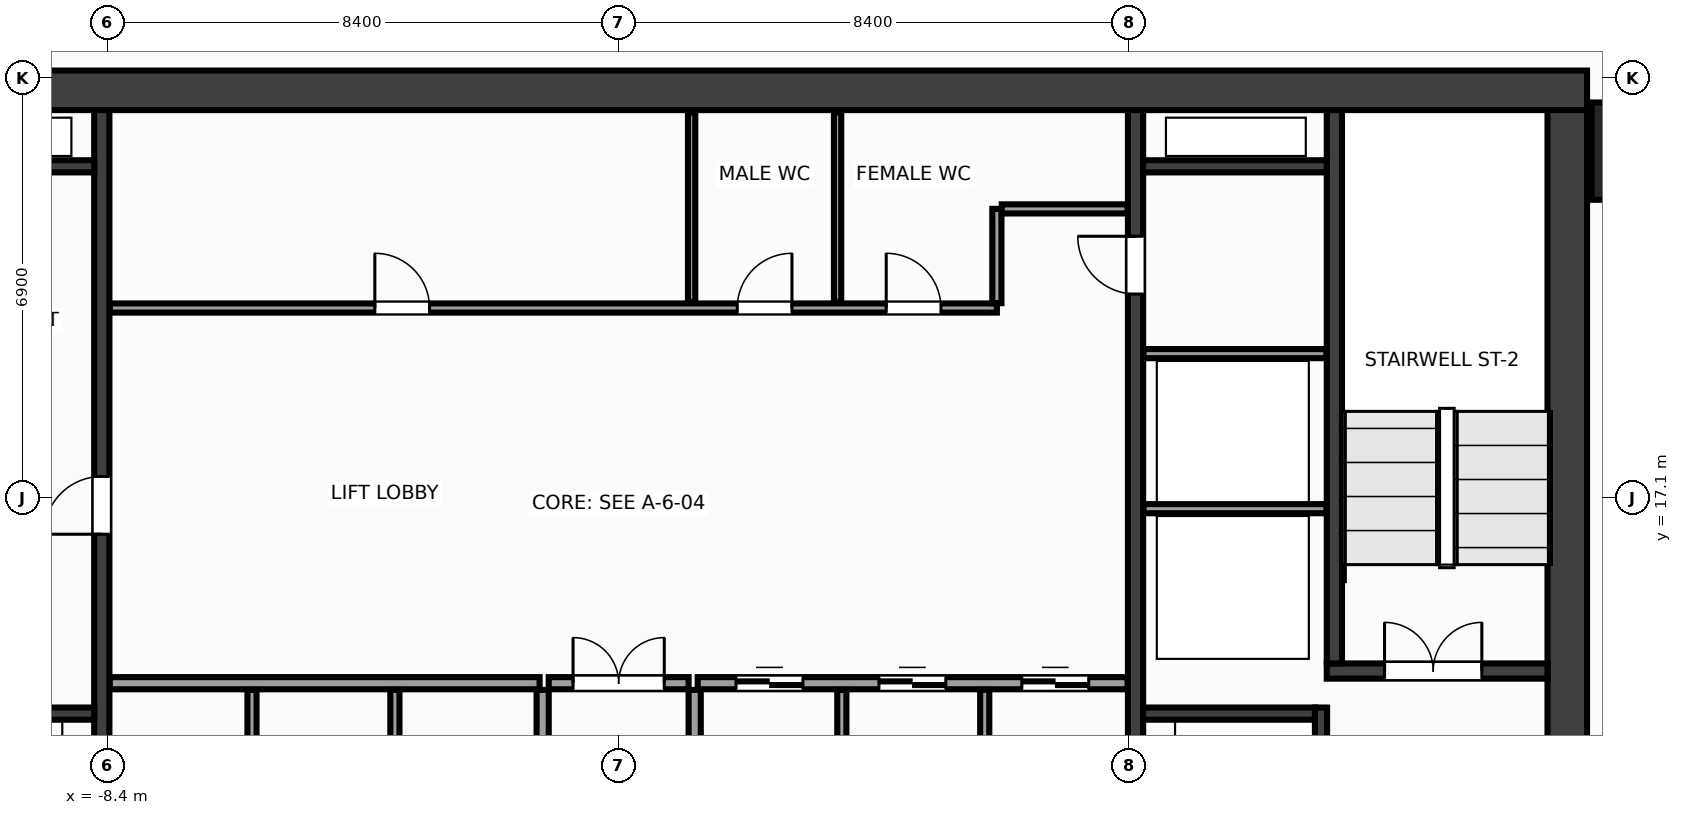
"""IFC4 building model, lengths in metres.
Left out: names, types, materials, properties, quantities, classifications, styles, units other than length and angle.
Written with IfcOpenShell. Run it as: python <this file> out.ifc"""

import sys

from ifc_helpers import new_model, si_unit, direction, frame, frame_2d, origin, origin_2d, place, context, subcontext, project, spatial, rectangle, extrude, source, transform, mapped, element, fill, save


model = new_model("IFC4")
c1 = context("Model", 3, precision=1e-05, world=origin(), true_north=direction((0.0, 1.0)))
c2 = subcontext(c1, "Body", "Model", "MODEL_VIEW")
j1 = project(units=[si_unit("LENGTHUNIT", "METRE"), si_unit("PLANEANGLEUNIT", "RADIAN")], contexts=[c1])
p1 = place(None, origin())
s1 = spatial("IfcSite", under=j1, at=p1, CompositionType="ELEMENT")
p2 = place(p1, origin())
s2 = spatial("IfcBuilding", under=s1, at=p2, CompositionType="ELEMENT")
p3 = place(p2, frame((0.0, 0.0, 81.2)))
s3 = spatial("IfcBuildingStorey", under=s2, at=p3, CompositionType="ELEMENT", Elevation=81.2)
m1 = source(origin(), c2, "Body", "SweptSolid", [
    extrude(rectangle(XDim=31.85, YDim=0.65, at=frame_2d((15.925, 0.0))), origin(), (0.0, 0.0, 1.0), 3.6),
])
p4 = place(p3, frame((-15.925, 23.8, 0.0), z_axis=(0.0, 0.0, 1.0), x_axis=(1.0, 0.0, 0.0)))
e1 = element("IfcWall", 1, at=p4, inside=s3, PredefinedType="SHEAR", context=c2, shape_type="MappedRepresentation", body=[
    mapped(m1, transform((0.0, 0.0, 0.0), x_axis=(1.0, 0.0, 0.0), y_axis=(0.0, 1.0, 0.0), z_axis=(0.0, 0.0, 1.0), scale=1.0)),
])
m2 = source(origin(), c2, "Body", "SweptSolid", [
    extrude(rectangle(XDim=12.95, YDim=0.65, at=frame_2d((6.475, 0.0))), origin(), (0.0, 0.0, 1.0), 3.6),
])
p5 = place(p3, frame((15.6, 10.525, 0.0), z_axis=(0.0, 0.0, 1.0), x_axis=(0.0, 1.0, 0.0)))
e2 = element("IfcWall", 2, at=p5, inside=s3, PredefinedType="SHEAR", context=c2, shape_type="MappedRepresentation", body=[
    mapped(m2, transform((0.0, 0.0, 0.0), x_axis=(1.0, 0.0, 0.0), y_axis=(0.0, 1.0, 0.0), z_axis=(0.0, 0.0, 1.0), scale=1.0)),
])
m3 = source(origin(), c2, "Body", "SweptSolid", [
    extrude(rectangle(XDim=12.95, YDim=0.25, at=frame_2d((6.475, 0.0))), origin(), (0.0, 0.0, 1.0), 3.6),
])
p6 = place(p3, frame((-8.5, 10.525, 0.0), z_axis=(0.0, 0.0, 1.0), x_axis=(0.0, 1.0, 0.0)))
e3 = element("IfcWall", 3, at=p6, inside=s3, PredefinedType="SHEAR", context=c2, shape_type="MappedRepresentation", body=[
    mapped(m3, transform((0.0, 0.0, 0.0), x_axis=(1.0, 0.0, 0.0), y_axis=(0.0, 1.0, 0.0), z_axis=(0.0, 0.0, 1.0), scale=1.0)),
])
p7 = place(p6, frame((5.975, 0.0, 0.0)))
e4 = element("IfcOpeningElement", 4, at=p7, cuts=e3, PredefinedType="OPENING", context=c2, shape_type="SweptSolid", body=[
    extrude(rectangle(XDim=0.95, YDim=2.15, at=frame_2d((0.475, 1.075))), frame((0.0, 0.137, 0.0), z_axis=(0.0, -1.0, 0.0), x_axis=(1.0, 0.0, 0.0)), (0.0, 0.0, 1.0), 0.274),
])
p8 = place(p3, frame((8.5, 10.525, 0.0), z_axis=(0.0, 0.0, 1.0), x_axis=(0.0, 1.0, 0.0)))
e5 = element("IfcWall", 5, at=p8, inside=s3, PredefinedType="SHEAR", context=c2, shape_type="MappedRepresentation", body=[
    mapped(m3, transform((0.0, 0.0, 0.0), x_axis=(1.0, 0.0, 0.0), y_axis=(0.0, 1.0, 0.0), z_axis=(0.0, 0.0, 1.0), scale=1.0)),
])
p9 = place(p8, frame((9.925, 0.0, 0.0)))
e6 = element("IfcOpeningElement", 6, at=p9, cuts=e5, PredefinedType="OPENING", context=c2, shape_type="SweptSolid", body=[
    extrude(rectangle(XDim=0.95, YDim=2.15, at=frame_2d((0.475, 1.075))), frame((0.0, 0.137, 0.0), z_axis=(0.0, -1.0, 0.0), x_axis=(1.0, 0.0, 0.0)), (0.0, 0.0, 1.0), 0.274),
])
m4 = source(origin(), c2, "Body", "SweptSolid", [
    extrude(rectangle(XDim=3.63, YDim=0.25, at=frame_2d((1.815, 0.0))), origin(), (0.0, 0.0, 1.0), 3.6),
])
p10 = place(p3, frame((11.645, 14.25, 0.0), z_axis=(0.0, 0.0, 1.0), x_axis=(1.0, 0.0, 0.0)))
e7 = element("IfcWall", 7, at=p10, inside=s3, PredefinedType="SHEAR", context=c2, shape_type="MappedRepresentation", body=[
    mapped(m4, transform((0.0, 0.0, 0.0), x_axis=(1.0, 0.0, 0.0), y_axis=(0.0, 1.0, 0.0), z_axis=(0.0, 0.0, 1.0), scale=1.0)),
])
p11 = place(p10, frame((0.95, 0.0, 0.0)))
e8 = element("IfcOpeningElement", 8, at=p11, cuts=e7, PredefinedType="OPENING", context=c2, shape_type="SweptSolid", body=[
    extrude(rectangle(XDim=1.6, YDim=2.15, at=frame_2d((0.8, 1.075))), frame((0.0, 0.137, 0.0), z_axis=(0.0, -1.0, 0.0), x_axis=(1.0, 0.0, 0.0)), (0.0, 0.0, 1.0), 0.274),
])
m5 = source(origin(), c2, "Body", "SweptSolid", [
    extrude(rectangle(XDim=9.1, YDim=0.25, at=frame_2d((4.55, 0.0))), origin(), (0.0, 0.0, 1.0), 3.6),
])
p12 = place(p3, frame((11.77, 14.375, 0.0), z_axis=(0.0, 0.0, 1.0), x_axis=(0.0, 1.0, 0.0)))
e9 = element("IfcWall", 9, at=p12, inside=s3, PredefinedType="SHEAR", context=c2, shape_type="MappedRepresentation", body=[
    mapped(m5, transform((0.0, 0.0, 0.0), x_axis=(1.0, 0.0, 0.0), y_axis=(0.0, 1.0, 0.0), z_axis=(0.0, 0.0, 1.0), scale=1.0)),
])
m6 = source(origin(), c2, "Body", "SweptSolid", [
    extrude(rectangle(XDim=2.825, YDim=0.2, at=frame_2d((1.413, 0.0))), origin(), (0.0, 0.0, 1.0), 3.6),
])
p13 = place(p3, frame((-11.45, 13.55, 0.0), z_axis=(0.0, 0.0, 1.0), x_axis=(1.0, 0.0, 0.0)))
e10 = element("IfcWall", 10, at=p13, inside=s3, PredefinedType="SHEAR", context=c2, shape_type="MappedRepresentation", body=[
    mapped(m6, transform((0.0, 0.0, 0.0), x_axis=(1.0, 0.0, 0.0), y_axis=(0.0, 1.0, 0.0), z_axis=(0.0, 0.0, 1.0), scale=1.0)),
])
m7 = source(origin(), c2, "Body", "SweptSolid", [
    extrude(rectangle(XDim=3.125, YDim=0.2, at=frame_2d((1.562, 0.0))), origin(), (0.0, 0.0, 1.0), 3.6),
])
p14 = place(p3, frame((11.55, 10.525, 0.0), z_axis=(0.0, 0.0, 1.0), x_axis=(0.0, 1.0, 0.0)))
e11 = element("IfcWall", 11, at=p14, inside=s3, PredefinedType="SHEAR", context=c2, shape_type="MappedRepresentation", body=[
    mapped(m7, transform((0.0, 0.0, 0.0), x_axis=(1.0, 0.0, 0.0), y_axis=(0.0, 1.0, 0.0), z_axis=(0.0, 0.0, 1.0), scale=1.0)),
])
p15 = place(p14, frame((0.9, 0.0, 0.0)))
e12 = element("IfcOpeningElement", 12, at=p15, cuts=e11, PredefinedType="OPENING", context=c2, shape_type="SweptSolid", body=[
    extrude(rectangle(XDim=1.1, YDim=2.15, at=frame_2d((0.55, 1.075))), frame((0.0, 0.112, 0.0), z_axis=(0.0, -1.0, 0.0), x_axis=(1.0, 0.0, 0.0)), (0.0, 0.0, 1.0), 0.224),
])
p16 = place(p3, frame((8.625, 13.55, 0.0), z_axis=(0.0, 0.0, 1.0), x_axis=(1.0, 0.0, 0.0)))
e13 = element("IfcWall", 13, at=p16, inside=s3, PredefinedType="SHEAR", context=c2, shape_type="MappedRepresentation", body=[
    mapped(m6, transform((0.0, 0.0, 0.0), x_axis=(1.0, 0.0, 0.0), y_axis=(0.0, 1.0, 0.0), z_axis=(0.0, 0.0, 1.0), scale=1.0)),
])
m8 = source(origin(), c2, "Body", "SweptSolid", [
    extrude(rectangle(XDim=3.02, YDim=0.2, at=frame_2d((1.51, 0.0))), origin(), (0.0, 0.0, 1.0), 3.6),
])
for number, where, z_axis, x_axis in (
    (14, (-11.645, 22.55, 0.0), (0.0, 0.0, 1.0), (1.0, 0.0, 0.0)),
    (15, (8.625, 22.55, 0.0), (0.0, 0.0, 1.0), (1.0, 0.0, 0.0)),
):
    element("IfcWall", number, at=place(p3, frame(where, z_axis=z_axis, x_axis=x_axis)), inside=s3, PredefinedType="SHEAR", context=c2, shape_type="MappedRepresentation", body=[
        mapped(m8, transform((0.0, 0.0, 0.0), x_axis=(1.0, 0.0, 0.0), y_axis=(0.0, 1.0, 0.0), z_axis=(0.0, 0.0, 1.0), scale=1.0)),
    ])
m9 = source(origin(), c2, "Body", "SweptSolid", [
    extrude(rectangle(XDim=1.6, YDim=1.6, at=origin_2d()), origin(), (0.0, 0.0, 1.0), 3.6),
])
p17 = place(p3, frame((16.8, 22.8, 0.0), z_axis=(0.0, 0.0, 1.0), x_axis=(1.0, 0.0, 0.0)))
e16 = element("IfcColumn", 16, at=p17, inside=s3, PredefinedType="COLUMN", context=c2, shape_type="MappedRepresentation", body=[
    mapped(m9, transform((0.0, 0.0, 0.0), x_axis=(1.0, 0.0, 0.0), y_axis=(0.0, 1.0, 0.0), z_axis=(0.0, 0.0, 1.0), scale=1.0)),
])
m10 = source(origin(), c2, "Body", "SweptSolid", [
    extrude(rectangle(XDim=3.01, YDim=0.15, at=frame_2d((1.505, 0.0))), origin(), (0.0, 0.0, 1.0), 3.36),
])
for number, where, z_axis, x_axis in (
    (17, (8.63, 16.92, 0.0), (0.0, 0.0, 1.0), (1.0, 0.0, 0.0)),
    (18, (8.63, 19.47, 0.0), (0.0, 0.0, 1.0), (1.0, 0.0, 0.0)),
):
    element("IfcWall", number, at=place(p3, frame(where, z_axis=z_axis, x_axis=x_axis)), inside=s3, PredefinedType="PARTITIONING", context=c2, shape_type="MappedRepresentation", body=[
        mapped(m10, transform((0.0, 0.0, 0.0), x_axis=(1.0, 0.0, 0.0), y_axis=(0.0, 1.0, 0.0), z_axis=(0.0, 0.0, 1.0), scale=1.0)),
    ])
m11 = source(origin(), c2, "Body", "SweptSolid", [
    extrude(rectangle(XDim=7.07, YDim=0.2, at=frame_2d((3.535, 0.0))), origin(), (0.0, 0.0, 1.0), 3.36),
])
p18 = place(p3, frame((-8.37, 14.05, 0.0), z_axis=(0.0, 0.0, 1.0), x_axis=(1.0, 0.0, 0.0)))
e19 = element("IfcWall", 19, at=p18, inside=s3, PredefinedType="PARTITIONING", context=c2, shape_type="MappedRepresentation", body=[
    mapped(m11, transform((0.0, 0.0, 0.0), x_axis=(1.0, 0.0, 0.0), y_axis=(0.0, 1.0, 0.0), z_axis=(0.0, 0.0, 1.0), scale=1.0)),
])
p19 = place(p3, frame((1.3, 14.05, 0.0), z_axis=(0.0, 0.0, 1.0), x_axis=(1.0, 0.0, 0.0)))
e20 = element("IfcWall", 20, at=p19, inside=s3, PredefinedType="PARTITIONING", context=c2, shape_type="MappedRepresentation", body=[
    mapped(m11, transform((0.0, 0.0, 0.0), x_axis=(1.0, 0.0, 0.0), y_axis=(0.0, 1.0, 0.0), z_axis=(0.0, 0.0, 1.0), scale=1.0)),
])
p20 = place(p19, frame((0.63, 0.0, 0.0)))
e21 = element("IfcOpeningElement", 21, at=p20, cuts=e20, PredefinedType="OPENING", context=c2, shape_type="SweptSolid", body=[
    extrude(rectangle(XDim=1.1, YDim=2.15, at=frame_2d((0.55, 1.075))), frame((0.0, 0.112, 0.0), z_axis=(0.0, -1.0, 0.0), x_axis=(1.0, 0.0, 0.0)), (0.0, 0.0, 1.0), 0.224),
])
p21 = place(p19, frame((2.98, 0.0, 0.0)))
e22 = element("IfcOpeningElement", 22, at=p21, cuts=e20, PredefinedType="OPENING", context=c2, shape_type="SweptSolid", body=[
    extrude(rectangle(XDim=1.1, YDim=2.15, at=frame_2d((0.55, 1.075))), frame((0.0, 0.112, 0.0), z_axis=(0.0, -1.0, 0.0), x_axis=(1.0, 0.0, 0.0)), (0.0, 0.0, 1.0), 0.224),
])
p22 = place(p19, frame((5.33, 0.0, 0.0)))
e23 = element("IfcOpeningElement", 23, at=p22, cuts=e20, PredefinedType="OPENING", context=c2, shape_type="SweptSolid", body=[
    extrude(rectangle(XDim=1.1, YDim=2.15, at=frame_2d((0.55, 1.075))), frame((0.0, 0.112, 0.0), z_axis=(0.0, -1.0, 0.0), x_axis=(1.0, 0.0, 0.0)), (0.0, 0.0, 1.0), 0.224),
])
m12 = source(origin(), c2, "Body", "SweptSolid", [
    extrude(rectangle(XDim=3.415, YDim=0.2, at=frame_2d((1.708, 0.0))), origin(), (0.0, 0.0, 1.0), 3.36),
])
for number, where, z_axis, x_axis in (
    (24, (-1.25, 10.525, 0.0), (0.0, 0.0, 1.0), (0.0, 1.0, 0.0)),
    (25, (1.25, 10.525, 0.0), (0.0, 0.0, 1.0), (0.0, 1.0, 0.0)),
):
    element("IfcWall", number, at=place(p3, frame(where, z_axis=z_axis, x_axis=x_axis)), inside=s3, PredefinedType="PARTITIONING", context=c2, shape_type="MappedRepresentation", body=[
        mapped(m12, transform((0.0, 0.0, 0.0), x_axis=(1.0, 0.0, 0.0), y_axis=(0.0, 1.0, 0.0), z_axis=(0.0, 0.0, 1.0), scale=1.0)),
    ])
m13 = source(origin(), c2, "Body", "SweptSolid", [
    extrude(rectangle(XDim=2.3, YDim=0.2, at=frame_2d((1.15, 0.0))), origin(), (0.0, 0.0, 1.0), 3.36),
])
p23 = place(p3, frame((-1.15, 14.05, 0.0), z_axis=(0.0, 0.0, 1.0), x_axis=(1.0, 0.0, 0.0)))
e26 = element("IfcWall", 26, at=p23, inside=s3, PredefinedType="PARTITIONING", context=c2, shape_type="MappedRepresentation", body=[
    mapped(m13, transform((0.0, 0.0, 0.0), x_axis=(1.0, 0.0, 0.0), y_axis=(0.0, 1.0, 0.0), z_axis=(0.0, 0.0, 1.0), scale=1.0)),
])
p24 = place(p23, frame((0.4, 0.0, 0.0)))
e27 = element("IfcOpeningElement", 27, at=p24, cuts=e26, PredefinedType="OPENING", context=c2, shape_type="SweptSolid", body=[
    extrude(rectangle(XDim=1.5, YDim=2.2, at=frame_2d((0.75, 1.1))), frame((0.0, 0.112, 0.0), z_axis=(0.0, -1.0, 0.0), x_axis=(1.0, 0.0, 0.0)), (0.0, 0.0, 1.0), 0.224),
])
m14 = source(origin(), c2, "Body", "SweptSolid", [
    extrude(rectangle(XDim=14.59, YDim=0.15, at=frame_2d((7.295, 0.0))), origin(), (0.0, 0.0, 1.0), 3.36),
])
p25 = place(p3, frame((-8.37, 20.22, 0.0), z_axis=(0.0, 0.0, 1.0), x_axis=(1.0, 0.0, 0.0)))
e28 = element("IfcWall", 28, at=p25, inside=s3, PredefinedType="PARTITIONING", context=c2, shape_type="MappedRepresentation", body=[
    mapped(m14, transform((0.0, 0.0, 0.0), x_axis=(1.0, 0.0, 0.0), y_axis=(0.0, 1.0, 0.0), z_axis=(0.0, 0.0, 1.0), scale=1.0)),
])
p26 = place(p25, frame((4.36, 0.0, 0.0)))
e29 = element("IfcOpeningElement", 29, at=p26, cuts=e28, PredefinedType="OPENING", context=c2, shape_type="SweptSolid", body=[
    extrude(rectangle(XDim=0.9, YDim=2.15, at=frame_2d((0.45, 1.075))), frame((0.0, 0.087, 0.0), z_axis=(0.0, -1.0, 0.0), x_axis=(1.0, 0.0, 0.0)), (0.0, 0.0, 1.0), 0.174),
])
p27 = place(p25, frame((10.32, 0.0, 0.0)))
e30 = element("IfcOpeningElement", 30, at=p27, cuts=e28, PredefinedType="OPENING", context=c2, shape_type="SweptSolid", body=[
    extrude(rectangle(XDim=0.9, YDim=2.15, at=frame_2d((0.45, 1.075))), frame((0.0, 0.087, 0.0), z_axis=(0.0, -1.0, 0.0), x_axis=(1.0, 0.0, 0.0)), (0.0, 0.0, 1.0), 0.174),
])
p28 = place(p25, frame((12.77, 0.0, 0.0)))
e31 = element("IfcOpeningElement", 31, at=p28, cuts=e28, PredefinedType="OPENING", context=c2, shape_type="SweptSolid", body=[
    extrude(rectangle(XDim=0.9, YDim=2.15, at=frame_2d((0.45, 1.075))), frame((0.0, 0.087, 0.0), z_axis=(0.0, -1.0, 0.0), x_axis=(1.0, 0.0, 0.0)), (0.0, 0.0, 1.0), 0.174),
])
m15 = source(origin(), c2, "Body", "SweptSolid", [
    extrude(rectangle(XDim=1.55, YDim=0.15, at=frame_2d((0.775, 0.0))), origin(), (0.0, 0.0, 1.0), 3.36),
])
p29 = place(p3, frame((6.22, 20.3, 0.0), z_axis=(0.0, 0.0, 1.0), x_axis=(0.0, 1.0, 0.0)))
e32 = element("IfcWall", 32, at=p29, inside=s3, PredefinedType="PARTITIONING", context=c2, shape_type="MappedRepresentation", body=[
    mapped(m15, transform((0.0, 0.0, 0.0), x_axis=(1.0, 0.0, 0.0), y_axis=(0.0, 1.0, 0.0), z_axis=(0.0, 0.0, 1.0), scale=1.0)),
])
m16 = source(origin(), c2, "Body", "SweptSolid", [
    extrude(rectangle(XDim=2.07, YDim=0.15, at=frame_2d((1.035, 0.0))), origin(), (0.0, 0.0, 1.0), 3.36),
])
p30 = place(p3, frame((6.3, 21.85, 0.0), z_axis=(0.0, 0.0, 1.0), x_axis=(1.0, 0.0, 0.0)))
e33 = element("IfcWall", 33, at=p30, inside=s3, PredefinedType="PARTITIONING", context=c2, shape_type="MappedRepresentation", body=[
    mapped(m16, transform((0.0, 0.0, 0.0), x_axis=(1.0, 0.0, 0.0), y_axis=(0.0, 1.0, 0.0), z_axis=(0.0, 0.0, 1.0), scale=1.0)),
])
m17 = source(origin(), c2, "Body", "SweptSolid", [
    extrude(rectangle(XDim=3.415, YDim=0.15, at=frame_2d((1.708, 0.0))), origin(), (0.0, 0.0, 1.0), 3.36),
])
for number, where, z_axis, x_axis in (
    (34, (-6.03, 10.525, 0.0), (0.0, 0.0, 1.0), (0.0, 1.0, 0.0)),
    (35, (-3.68, 10.525, 0.0), (0.0, 0.0, 1.0), (0.0, 1.0, 0.0)),
    (36, (3.67, 10.525, 0.0), (0.0, 0.0, 1.0), (0.0, 1.0, 0.0)),
    (37, (6.02, 10.525, 0.0), (0.0, 0.0, 1.0), (0.0, 1.0, 0.0)),
):
    element("IfcWall", number, at=place(p3, frame(where, z_axis=z_axis, x_axis=x_axis)), inside=s3, PredefinedType="PARTITIONING", context=c2, shape_type="MappedRepresentation", body=[
        mapped(m17, transform((0.0, 0.0, 0.0), x_axis=(1.0, 0.0, 0.0), y_axis=(0.0, 1.0, 0.0), z_axis=(0.0, 0.0, 1.0), scale=1.0)),
    ])
m18 = source(origin(), c2, "Body", "SweptSolid", [
    extrude(rectangle(XDim=3.115, YDim=0.12, at=frame_2d((1.558, 0.0))), origin(), (0.0, 0.0, 1.0), 3.36),
])
for number, where, z_axis, x_axis in (
    (38, (1.2, 20.32, 0.0), (0.0, 0.0, 1.0), (0.0, 1.0, 0.0)),
    (39, (3.6, 20.32, 0.0), (0.0, 0.0, 1.0), (0.0, 1.0, 0.0)),
):
    element("IfcWall", number, at=place(p3, frame(where, z_axis=z_axis, x_axis=x_axis)), inside=s3, PredefinedType="PARTITIONING", context=c2, shape_type="MappedRepresentation", body=[
        mapped(m18, transform((0.0, 0.0, 0.0), x_axis=(1.0, 0.0, 0.0), y_axis=(0.0, 1.0, 0.0), z_axis=(0.0, 0.0, 1.0), scale=1.0)),
    ])
m19 = source(origin(), c2, "Body", "SweptSolid", [
    extrude(rectangle(XDim=1.6, YDim=2.15, at=frame_2d((0.8, 1.075))), frame((0.0, 0.025, 0.0), z_axis=(0.0, -1.0, 0.0), x_axis=(1.0, 0.0, 0.0)), (0.0, 0.0, 1.0), 0.05),
])
p31 = place(p11, origin())
e40 = element("IfcDoor", 40, at=p31, inside=s3, OperationType="DOUBLE_DOOR_SINGLE_SWING", PredefinedType="DOOR", context=c2, shape_type="MappedRepresentation", body=[
    mapped(m19, transform((0.0, 0.0, 0.0), x_axis=(1.0, 0.0, 0.0), y_axis=(0.0, 1.0, 0.0), z_axis=(0.0, 0.0, 1.0), scale=1.0)),
])
fill(e8, e40)
m20 = source(origin(), c2, "Body", "SweptSolid", [
    extrude(rectangle(XDim=0.95, YDim=2.15, at=frame_2d((0.475, 1.075))), frame((0.0, 0.025, 0.0), z_axis=(0.0, -1.0, 0.0), x_axis=(1.0, 0.0, 0.0)), (0.0, 0.0, 1.0), 0.05),
])
p32 = place(p7, origin())
e41 = element("IfcDoor", 41, at=p32, inside=s3, OperationType="SINGLE_SWING_LEFT", PredefinedType="DOOR", context=c2, shape_type="MappedRepresentation", body=[
    mapped(m20, transform((0.0, 0.0, 0.0), x_axis=(1.0, 0.0, 0.0), y_axis=(0.0, 1.0, 0.0), z_axis=(0.0, 0.0, 1.0), scale=1.0)),
])
fill(e4, e41)
m21 = source(origin(), c2, "Body", "SweptSolid", [
    extrude(rectangle(XDim=0.95, YDim=2.15, at=frame_2d((0.475, 1.075))), frame((0.0, 0.025, 0.0), z_axis=(0.0, -1.0, 0.0), x_axis=(1.0, 0.0, 0.0)), (0.0, 0.0, 1.0), 0.05),
])
p33 = place(p9, origin())
e42 = element("IfcDoor", 42, at=p33, inside=s3, OperationType="SINGLE_SWING_RIGHT", PredefinedType="DOOR", context=c2, shape_type="MappedRepresentation", body=[
    mapped(m21, transform((0.0, 0.0, 0.0), x_axis=(1.0, 0.0, 0.0), y_axis=(0.0, 1.0, 0.0), z_axis=(0.0, 0.0, 1.0), scale=1.0)),
])
fill(e6, e42)
m22 = source(origin(), c2, "Body", "SweptSolid", [
    extrude(rectangle(XDim=1.1, YDim=2.15, at=frame_2d((0.55, 1.075))), frame((0.0, 0.025, 0.0), z_axis=(0.0, -1.0, 0.0), x_axis=(1.0, 0.0, 0.0)), (0.0, 0.0, 1.0), 0.05),
])
p34 = place(p20, origin())
e43 = element("IfcDoor", 43, at=p34, inside=s3, OperationType="DOUBLE_DOOR_SLIDING", PredefinedType="DOOR", context=c2, shape_type="MappedRepresentation", body=[
    mapped(m22, transform((0.0, 0.0, 0.0), x_axis=(1.0, 0.0, 0.0), y_axis=(0.0, 1.0, 0.0), z_axis=(0.0, 0.0, 1.0), scale=1.0)),
])
fill(e21, e43)
p35 = place(p21, origin())
e44 = element("IfcDoor", 44, at=p35, inside=s3, OperationType="DOUBLE_DOOR_SLIDING", PredefinedType="DOOR", context=c2, shape_type="MappedRepresentation", body=[
    mapped(m22, transform((0.0, 0.0, 0.0), x_axis=(1.0, 0.0, 0.0), y_axis=(0.0, 1.0, 0.0), z_axis=(0.0, 0.0, 1.0), scale=1.0)),
])
fill(e22, e44)
p36 = place(p22, origin())
e45 = element("IfcDoor", 45, at=p36, inside=s3, OperationType="DOUBLE_DOOR_SLIDING", PredefinedType="DOOR", context=c2, shape_type="MappedRepresentation", body=[
    mapped(m22, transform((0.0, 0.0, 0.0), x_axis=(1.0, 0.0, 0.0), y_axis=(0.0, 1.0, 0.0), z_axis=(0.0, 0.0, 1.0), scale=1.0)),
])
fill(e23, e45)
m23 = source(origin(), c2, "Body", "SweptSolid", [
    extrude(rectangle(XDim=1.5, YDim=2.2, at=frame_2d((0.75, 1.1))), frame((0.0, 0.025, 0.0), z_axis=(0.0, -1.0, 0.0), x_axis=(1.0, 0.0, 0.0)), (0.0, 0.0, 1.0), 0.05),
])
p37 = place(p24, origin())
e46 = element("IfcDoor", 46, at=p37, inside=s3, OperationType="DOUBLE_DOOR_SINGLE_SWING", PredefinedType="DOOR", context=c2, shape_type="MappedRepresentation", body=[
    mapped(m23, transform((0.0, 0.0, 0.0), x_axis=(1.0, 0.0, 0.0), y_axis=(0.0, 1.0, 0.0), z_axis=(0.0, 0.0, 1.0), scale=1.0)),
])
fill(e27, e46)
m24 = source(origin(), c2, "Body", "SweptSolid", [
    extrude(rectangle(XDim=0.9, YDim=2.15, at=frame_2d((0.45, 1.075))), frame((0.0, 0.025, 0.0), z_axis=(0.0, -1.0, 0.0), x_axis=(1.0, 0.0, 0.0)), (0.0, 0.0, 1.0), 0.05),
])
p38 = place(p26, origin())
e47 = element("IfcDoor", 47, at=p38, inside=s3, OperationType="SINGLE_SWING_LEFT", PredefinedType="DOOR", context=c2, shape_type="MappedRepresentation", body=[
    mapped(m24, transform((0.0, 0.0, 0.0), x_axis=(1.0, 0.0, 0.0), y_axis=(0.0, 1.0, 0.0), z_axis=(0.0, 0.0, 1.0), scale=1.0)),
])
fill(e29, e47)
p39 = place(p27, origin())
e48 = element("IfcDoor", 48, at=p39, inside=s3, OperationType="SINGLE_SWING_RIGHT", PredefinedType="DOOR", context=c2, shape_type="MappedRepresentation", body=[
    mapped(m24, transform((0.0, 0.0, 0.0), x_axis=(1.0, 0.0, 0.0), y_axis=(0.0, 1.0, 0.0), z_axis=(0.0, 0.0, 1.0), scale=1.0)),
])
fill(e30, e48)
p40 = place(p28, origin())
e49 = element("IfcDoor", 49, at=p40, inside=s3, OperationType="SINGLE_SWING_LEFT", PredefinedType="DOOR", context=c2, shape_type="MappedRepresentation", body=[
    mapped(m24, transform((0.0, 0.0, 0.0), x_axis=(1.0, 0.0, 0.0), y_axis=(0.0, 1.0, 0.0), z_axis=(0.0, 0.0, 1.0), scale=1.0)),
])
fill(e31, e49)
save(model, sys.argv[1])
